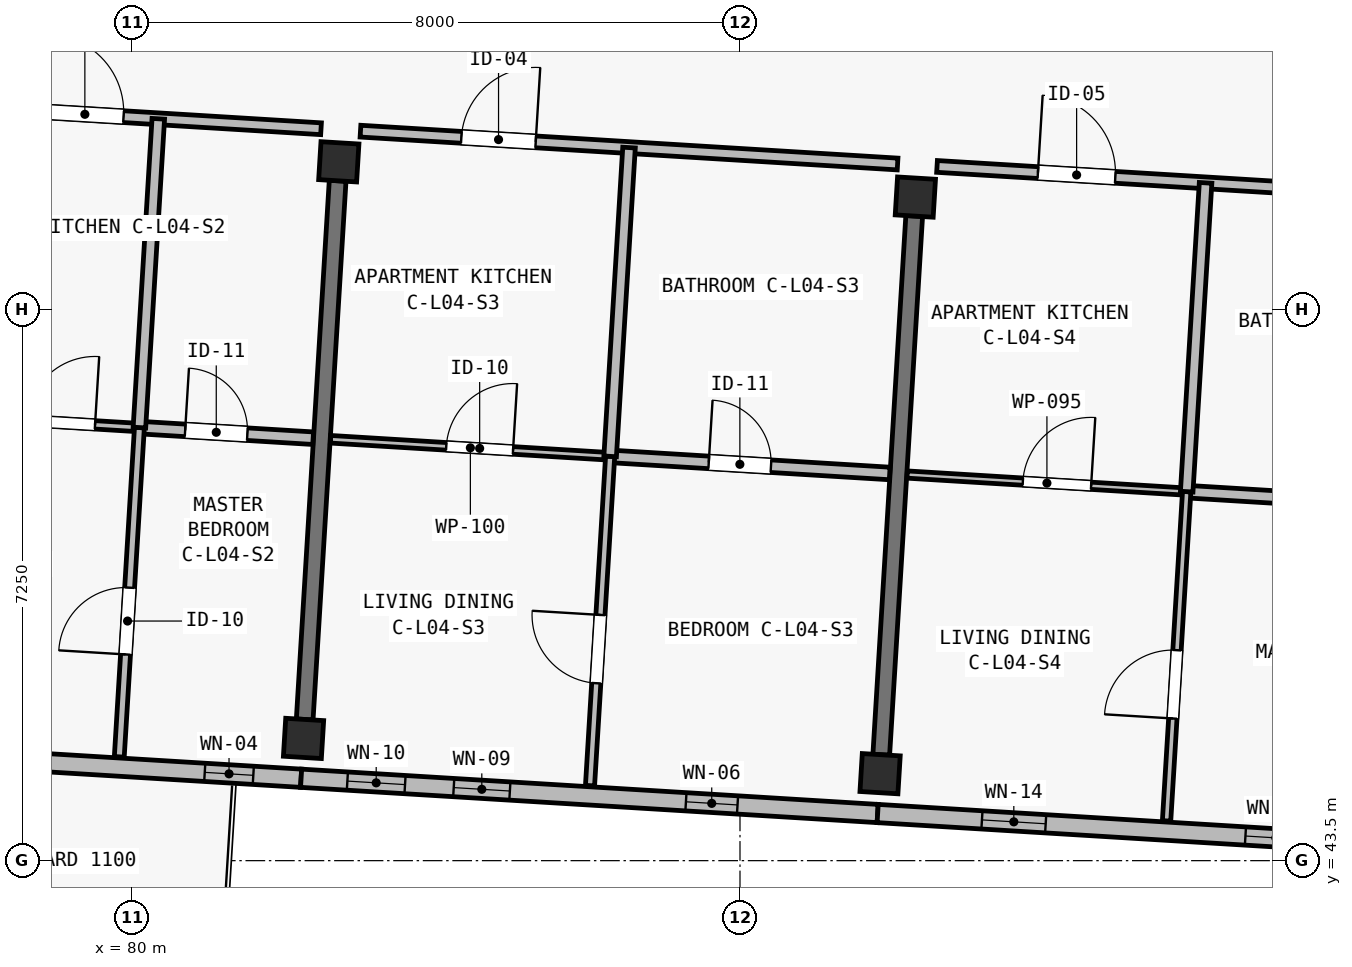
"""IFC4 building model, lengths in metres.
Left out: names, types, materials, properties, quantities, classifications, styles, units other than length and angle.
Written with IfcOpenShell. Run it as: python <this file> out.ifc"""

import sys

from ifc_helpers import new_model, si_unit, direction, frame, frame_2d, origin, origin_2d, place, context, subcontext, project, spatial, rectangle, extrude, element, fill, save


model = new_model("IFC4")
c1 = context("Model", 3, precision=1e-05, world=origin(), true_north=direction((0.0, 1.0)))
c2 = subcontext(c1, "Body", "Model", "MODEL_VIEW")
j1 = project(units=[si_unit("LENGTHUNIT", "METRE"), si_unit("PLANEANGLEUNIT", "RADIAN")], contexts=[c1])
p1 = place(None, origin())
s1 = spatial("IfcSite", under=j1, at=p1, CompositionType="ELEMENT")
p2 = place(p1, origin())
s2 = spatial("IfcBuilding", under=s1, at=p2, CompositionType="ELEMENT")
p3 = place(p2, frame((0.0, 0.0, 14.9)))
s3 = spatial("IfcBuildingStorey", under=s2, at=p3, CompositionType="ELEMENT", Elevation=14.9)
for number, where, z_axis, x_axis in (
    (1, (82.258, 45.108, 0.0), (0.0, 0.0, 1.0), (0.998, -0.061, 0.0)),
    (2, (82.721, 52.694, 0.0), (0.0, 0.0, 1.0), (0.998, -0.061, 0.0)),
    (3, (89.843, 44.644, 0.0), (0.0, 0.0, 1.0), (0.998, -0.061, 0.0)),
    (4, (90.307, 52.23, 0.0), (0.0, 0.0, 1.0), (0.998, -0.061, 0.0)),
):
    element("IfcColumn", number, at=place(p3, frame(where, z_axis=z_axis, x_axis=x_axis)), inside=s3, PredefinedType="COLUMN", context=c2, shape_type="SweptSolid", body=[
        extrude(rectangle(XDim=0.5, YDim=0.5, at=origin_2d()), origin(), (0.0, 0.0, 1.0), 3.25),
    ])
p4 = place(p3, frame((82.273, 45.358, 0.0), z_axis=(0.0, 0.0, 1.0), x_axis=(0.061070212127, 0.998133472633, 0.0)))
e5 = element("IfcWall", 5, at=p4, inside=s3, PredefinedType="SHEAR", context=c2, shape_type="SweptSolid", body=[
    extrude(rectangle(XDim=7.1, YDim=0.22, at=frame_2d((3.55, 0.0))), origin(), (0.0, 0.0, 1.0), 2.5),
])
p5 = place(p3, frame((89.859, 44.894, 0.0), z_axis=(0.0, 0.0, 1.0), x_axis=(0.061033859059, 0.99813569621, 0.0)))
e6 = element("IfcWall", 6, at=p5, inside=s3, PredefinedType="SHEAR", context=c2, shape_type="SweptSolid", body=[
    extrude(rectangle(XDim=7.1, YDim=0.22, at=frame_2d((3.55, 0.0))), origin(), (0.0, 0.0, 1.0), 2.5),
])
p6 = place(p3, frame((82.225, 44.584, 0.0), z_axis=(0.0, 0.0, 1.0), x_axis=(-0.998133591969, 0.061068261669, 0.0)))
e7 = element("IfcWall", 7, at=p6, inside=s3, PredefinedType="SOLIDWALL", context=c2, shape_type="SweptSolid", body=[
    extrude(rectangle(XDim=7.6, YDim=0.24, at=frame_2d((3.8, 0.0))), origin(), (0.0, 0.0, 1.0), 3.0),
])
p7 = place(p6, frame((5.019, 0.0, 0.0)))
e8 = element("IfcOpeningElement", 8, at=p7, cuts=e7, PredefinedType="OPENING", context=c2, shape_type="SweptSolid", body=[
    extrude(rectangle(XDim=1.8, YDim=2.12, at=frame_2d((0.9, 1.06))), frame((0.0, 0.135, 0.0), z_axis=(0.0, -1.0, 0.0), x_axis=(1.0, 0.0, 0.0)), (0.0, 0.0, 1.0), 0.27),
])
p8 = place(p6, frame((0.63, 0.0, 0.42)))
e9 = element("IfcOpeningElement", 9, at=p8, cuts=e7, PredefinedType="OPENING", context=c2, shape_type="SweptSolid", body=[
    extrude(rectangle(XDim=0.64, YDim=2.18, at=frame_2d((0.32, 1.09))), frame((0.0, 0.135, 0.0), z_axis=(0.0, -1.0, 0.0), x_axis=(1.0, 0.0, 0.0)), (0.0, 0.0, 1.0), 0.27),
])
p9 = place(p3, frame((89.811, 44.12, 0.0), z_axis=(0.0, 0.0, 1.0), x_axis=(-0.998135669243, 0.061034300063, 0.0)))
e10 = element("IfcWall", 10, at=p9, inside=s3, PredefinedType="SOLIDWALL", context=c2, shape_type="SweptSolid", body=[
    extrude(rectangle(XDim=7.6, YDim=0.24, at=frame_2d((3.8, 0.0))), origin(), (0.0, 0.0, 1.0), 3.0),
])
p10 = place(p9, frame((1.847, 0.0, 0.48)))
e11 = element("IfcOpeningElement", 11, at=p10, cuts=e10, PredefinedType="OPENING", context=c2, shape_type="SweptSolid", body=[
    extrude(rectangle(XDim=0.68, YDim=2.24, at=frame_2d((0.34, 1.12))), frame((0.0, 0.135, 0.0), z_axis=(0.0, -1.0, 0.0), x_axis=(1.0, 0.0, 0.0)), (0.0, 0.0, 1.0), 0.27),
])
p11 = place(p9, frame((4.848, 0.0, 0.48)))
e12 = element("IfcOpeningElement", 12, at=p11, cuts=e10, PredefinedType="OPENING", context=c2, shape_type="SweptSolid", body=[
    extrude(rectangle(XDim=0.74, YDim=2.26, at=frame_2d((0.37, 1.13))), frame((0.0, 0.135, 0.0), z_axis=(0.0, -1.0, 0.0), x_axis=(1.0, 0.0, 0.0)), (0.0, 0.0, 1.0), 0.27),
])
p12 = place(p9, frame((6.23, 0.0, 0.52)))
e13 = element("IfcOpeningElement", 13, at=p12, cuts=e10, PredefinedType="OPENING", context=c2, shape_type="SweptSolid", body=[
    extrude(rectangle(XDim=0.76, YDim=2.34, at=frame_2d((0.38, 1.17))), frame((0.0, 0.135, 0.0), z_axis=(0.0, -1.0, 0.0), x_axis=(1.0, 0.0, 0.0)), (0.0, 0.0, 1.0), 0.27),
])
p13 = place(p3, frame((97.397, 43.656, 0.0), z_axis=(0.0, 0.0, 1.0), x_axis=(-0.998135549572, 0.061036257095, 0.0)))
e14 = element("IfcWall", 14, at=p13, inside=s3, PredefinedType="SOLIDWALL", context=c2, shape_type="SweptSolid", body=[
    extrude(rectangle(XDim=7.6, YDim=0.24, at=frame_2d((3.8, 0.0))), origin(), (0.0, 0.0, 1.0), 3.0),
])
p14 = place(p13, frame((0.61, 0.0, 0.52)))
e15 = element("IfcOpeningElement", 15, at=p14, cuts=e14, PredefinedType="OPENING", context=c2, shape_type="SweptSolid", body=[
    extrude(rectangle(XDim=0.78, YDim=2.2, at=frame_2d((0.39, 1.1))), frame((0.0, 0.135, 0.0), z_axis=(0.0, -1.0, 0.0), x_axis=(1.0, 0.0, 0.0)), (0.0, 0.0, 1.0), 0.27),
])
p15 = place(p13, frame((1.952, 0.0, 0.42)))
e16 = element("IfcOpeningElement", 16, at=p15, cuts=e14, PredefinedType="OPENING", context=c2, shape_type="SweptSolid", body=[
    extrude(rectangle(XDim=0.8, YDim=2.3, at=frame_2d((0.4, 1.15))), frame((0.0, 0.135, 0.0), z_axis=(0.0, -1.0, 0.0), x_axis=(1.0, 0.0, 0.0)), (0.0, 0.0, 1.0), 0.27),
])
p16 = place(p13, frame((5.385, 0.0, 0.52)))
e17 = element("IfcOpeningElement", 17, at=p16, cuts=e14, PredefinedType="OPENING", context=c2, shape_type="SweptSolid", body=[
    extrude(rectangle(XDim=0.84, YDim=2.28, at=frame_2d((0.42, 1.14))), frame((0.0, 0.135, 0.0), z_axis=(0.0, -1.0, 0.0), x_axis=(1.0, 0.0, 0.0)), (0.0, 0.0, 1.0), 0.27),
])
p17 = place(p3, frame((78.415, 53.378, 0.0), z_axis=(0.0, 0.0, 1.0), x_axis=(0.998131852862, -0.061096679962, 0.0)))
e18 = element("IfcWall", 18, at=p17, inside=s3, PredefinedType="PARTITIONING", context=c2, shape_type="SweptSolid", body=[
    extrude(rectangle(XDim=4.08, YDim=0.155, at=frame_2d((2.04, 0.0))), origin(), (0.0, 0.0, 1.0), 2.97),
])
p18 = place(p17, frame((0.457, 0.0, 0.0)))
e19 = element("IfcOpeningElement", 19, at=p18, cuts=e18, PredefinedType="OPENING", context=c2, shape_type="SweptSolid", body=[
    extrude(rectangle(XDim=1.02, YDim=2.2, at=frame_2d((0.51, 1.1))), frame((0.0, 0.093, 0.0), z_axis=(0.0, -1.0, 0.0), x_axis=(1.0, 0.0, 0.0)), (0.0, 0.0, 1.0), 0.185),
])
p19 = place(p3, frame((75.028, 49.508, 0.0), z_axis=(0.0, 0.0, 1.0), x_axis=(0.998135637207, -0.061034823981, 0.0)))
e20 = element("IfcWall", 20, at=p19, inside=s3, PredefinedType="PARTITIONING", context=c2, shape_type="SweptSolid", body=[
    extrude(rectangle(XDim=5.08, YDim=0.11, at=frame_2d((2.54, 0.0))), origin(), (0.0, 0.0, 1.0), 2.97),
])
p20 = place(p19, frame((3.595, 0.0, 0.0)))
e21 = element("IfcOpeningElement", 21, at=p20, cuts=e20, PredefinedType="OPENING", context=c2, shape_type="SweptSolid", body=[
    extrude(rectangle(XDim=0.9, YDim=2.1, at=frame_2d((0.45, 1.05))), frame((0.0, 0.07, 0.0), z_axis=(0.0, -1.0, 0.0), x_axis=(1.0, 0.0, 0.0)), (0.0, 0.0, 1.0), 0.14),
])
p21 = place(p3, frame((80.098, 49.198, 0.0), z_axis=(0.0, 0.0, 1.0), x_axis=(0.998138723231, -0.060984335579, 0.0)))
e22 = element("IfcWall", 22, at=p21, inside=s3, PredefinedType="PLUMBINGWALL", context=c2, shape_type="SweptSolid", body=[
    extrude(rectangle(XDim=2.29, YDim=0.165, at=frame_2d((1.145, 0.0))), origin(), (0.0, 0.0, 1.0), 2.97),
])
p22 = place(p21, frame((0.603, 0.0, 0.0)))
e23 = element("IfcOpeningElement", 23, at=p22, cuts=e22, PredefinedType="OPENING", context=c2, shape_type="SweptSolid", body=[
    extrude(rectangle(XDim=0.82, YDim=2.08, at=frame_2d((0.41, 1.04))), frame((0.0, 0.097, 0.0), z_axis=(0.0, -1.0, 0.0), x_axis=(1.0, 0.0, 0.0)), (0.0, 0.0, 1.0), 0.195),
])
p23 = place(p3, frame((79.833, 44.866, 0.0), z_axis=(0.0, 0.0, 1.0), x_axis=(0.061036861365, 0.998135512621, 0.0)))
e24 = element("IfcWall", 24, at=p23, inside=s3, PredefinedType="PARTITIONING", context=c2, shape_type="SweptSolid", body=[
    extrude(rectangle(XDim=4.34, YDim=0.13, at=frame_2d((2.17, 0.0))), origin(), (0.0, 0.0, 1.0), 2.97),
])
p24 = place(p23, frame((1.35, 0.0, 0.0)))
e25 = element("IfcOpeningElement", 25, at=p24, cuts=e24, PredefinedType="OPENING", context=c2, shape_type="SweptSolid", body=[
    extrude(rectangle(XDim=0.88, YDim=2.1, at=frame_2d((0.44, 1.05))), frame((0.0, 0.08, 0.0), z_axis=(0.0, -1.0, 0.0), x_axis=(1.0, 0.0, 0.0)), (0.0, 0.0, 1.0), 0.16),
])
p25 = place(p3, frame((80.098, 49.198, 0.0), z_axis=(0.0, 0.0, 1.0), x_axis=(0.061063718724, 0.998133869907, 0.0)))
e26 = element("IfcWall", 26, at=p25, inside=s3, PredefinedType="PLUMBINGWALL", context=c2, shape_type="SweptSolid", body=[
    extrude(rectangle(XDim=4.07, YDim=0.165, at=frame_2d((2.035, 0.0))), origin(), (0.0, 0.0, 1.0), 2.97),
])
p26 = place(p3, frame((83.007, 53.097, 0.0), z_axis=(0.0, 0.0, 1.0), x_axis=(0.998135666539, -0.061034344288, 0.0)))
e27 = element("IfcWall", 27, at=p26, inside=s3, PredefinedType="PARTITIONING", context=c2, shape_type="SweptSolid", body=[
    extrude(rectangle(XDim=7.08, YDim=0.155, at=frame_2d((3.54, 0.0))), origin(), (0.0, 0.0, 1.0), 2.97),
])
p27 = place(p26, frame((1.33, 0.0, 0.0)))
e28 = element("IfcOpeningElement", 28, at=p27, cuts=e27, PredefinedType="OPENING", context=c2, shape_type="SweptSolid", body=[
    extrude(rectangle(XDim=0.98, YDim=2.15, at=frame_2d((0.49, 1.075))), frame((0.0, 0.093, 0.0), z_axis=(0.0, -1.0, 0.0), x_axis=(1.0, 0.0, 0.0)), (0.0, 0.0, 1.0), 0.185),
])
p28 = place(p3, frame((82.613, 49.044, 0.0), z_axis=(0.0, 0.0, 1.0), x_axis=(0.998136719672, -0.061017119263, 0.0)))
e29 = element("IfcWall", 29, at=p28, inside=s3, PredefinedType="PARTITIONING", context=c2, shape_type="SweptSolid", body=[
    extrude(rectangle(XDim=3.685, YDim=0.1, at=frame_2d((1.843, 0.0))), origin(), (0.0, 0.0, 1.0), 2.97),
])
p29 = place(p28, frame((1.525, 0.0, 0.0)))
e30 = element("IfcOpeningElement", 30, at=p29, cuts=e29, PredefinedType="OPENING", context=c2, shape_type="SweptSolid", body=[
    extrude(rectangle(XDim=0.88, YDim=2.1, at=frame_2d((0.44, 1.05))), frame((0.0, 0.065, 0.0), z_axis=(0.0, -1.0, 0.0), x_axis=(1.0, 0.0, 0.0)), (0.0, 0.0, 1.0), 0.13),
])
p30 = place(p3, frame((86.292, 48.819, 0.0), z_axis=(0.0, 0.0, 1.0), x_axis=(0.998132682596, -0.061083123148, 0.0)))
e31 = element("IfcWall", 31, at=p30, inside=s3, PredefinedType="PLUMBINGWALL", context=c2, shape_type="SweptSolid", body=[
    extrude(rectangle(XDim=3.685, YDim=0.165, at=frame_2d((1.843, 0.0))), origin(), (0.0, 0.0, 1.0), 2.97),
])
p31 = place(p30, frame((1.3, 0.0, 0.0)))
e32 = element("IfcOpeningElement", 32, at=p31, cuts=e31, PredefinedType="OPENING", context=c2, shape_type="SweptSolid", body=[
    extrude(rectangle(XDim=0.82, YDim=2.08, at=frame_2d((0.41, 1.04))), frame((0.0, 0.097, 0.0), z_axis=(0.0, -1.0, 0.0), x_axis=(1.0, 0.0, 0.0)), (0.0, 0.0, 1.0), 0.195),
])
p32 = place(p3, frame((86.027, 44.487, 0.0), z_axis=(0.0, 0.0, 1.0), x_axis=(0.06103343432, 0.998135722182, 0.0)))
e33 = element("IfcWall", 33, at=p32, inside=s3, PredefinedType="PARTITIONING", context=c2, shape_type="SweptSolid", body=[
    extrude(rectangle(XDim=4.34, YDim=0.12, at=frame_2d((2.17, 0.0))), origin(), (0.0, 0.0, 1.0), 2.97),
])
p33 = place(p32, frame((1.35, 0.0, 0.0)))
e34 = element("IfcOpeningElement", 34, at=p33, cuts=e33, PredefinedType="OPENING", context=c2, shape_type="SweptSolid", body=[
    extrude(rectangle(XDim=0.9, YDim=2.1, at=frame_2d((0.45, 1.05))), frame((0.0, 0.075, 0.0), z_axis=(0.0, -1.0, 0.0), x_axis=(1.0, 0.0, 0.0)), (0.0, 0.0, 1.0), 0.15),
])
p34 = place(p3, frame((86.292, 48.819, 0.0), z_axis=(0.0, 0.0, 1.0), x_axis=(0.061067374954, 0.99813364622, 0.0)))
e35 = element("IfcWall", 35, at=p34, inside=s3, PredefinedType="PLUMBINGWALL", context=c2, shape_type="SweptSolid", body=[
    extrude(rectangle(XDim=4.07, YDim=0.165, at=frame_2d((2.035, 0.0))), origin(), (0.0, 0.0, 1.0), 2.97),
])
p35 = place(p3, frame((90.593, 52.633, 0.0), z_axis=(0.0, 0.0, 1.0), x_axis=(0.998135538078, -0.061036445065, 0.0)))
e36 = element("IfcWall", 36, at=p35, inside=s3, PredefinedType="PARTITIONING", context=c2, shape_type="SweptSolid", body=[
    extrude(rectangle(XDim=7.08, YDim=0.155, at=frame_2d((3.54, 0.0))), origin(), (0.0, 0.0, 1.0), 2.97),
])
p36 = place(p35, frame((1.33, 0.0, 0.0)))
e37 = element("IfcOpeningElement", 37, at=p36, cuts=e36, PredefinedType="OPENING", context=c2, shape_type="SweptSolid", body=[
    extrude(rectangle(XDim=1.02, YDim=2.2, at=frame_2d((0.51, 1.1))), frame((0.0, 0.093, 0.0), z_axis=(0.0, -1.0, 0.0), x_axis=(1.0, 0.0, 0.0)), (0.0, 0.0, 1.0), 0.185),
])
p37 = place(p3, frame((90.199, 48.58, 0.0), z_axis=(0.0, 0.0, 1.0), x_axis=(0.998132682596, -0.061083123148, 0.0)))
e38 = element("IfcWall", 38, at=p37, inside=s3, PredefinedType="PARTITIONING", context=c2, shape_type="SweptSolid", body=[
    extrude(rectangle(XDim=3.685, YDim=0.095, at=frame_2d((1.843, 0.0))), origin(), (0.0, 0.0, 1.0), 2.97),
])
p38 = place(p37, frame((1.525, 0.0, 0.0)))
e39 = element("IfcOpeningElement", 39, at=p38, cuts=e38, PredefinedType="OPENING", context=c2, shape_type="SweptSolid", body=[
    extrude(rectangle(XDim=0.9, YDim=2.1, at=frame_2d((0.45, 1.05))), frame((0.0, 0.062, 0.0), z_axis=(0.0, -1.0, 0.0), x_axis=(1.0, 0.0, 0.0)), (0.0, 0.0, 1.0), 0.125),
])
p39 = place(p3, frame((93.877, 48.355, 0.0), z_axis=(0.0, 0.0, 1.0), x_axis=(0.998136472989, -0.061021154439, 0.0)))
e40 = element("IfcWall", 40, at=p39, inside=s3, PredefinedType="PLUMBINGWALL", context=c2, shape_type="SweptSolid", body=[
    extrude(rectangle(XDim=3.685, YDim=0.165, at=frame_2d((1.842, 0.0))), origin(), (0.0, 0.0, 1.0), 2.97),
])
p40 = place(p39, frame((1.3, 0.0, 0.0)))
e41 = element("IfcOpeningElement", 41, at=p40, cuts=e40, PredefinedType="OPENING", context=c2, shape_type="SweptSolid", body=[
    extrude(rectangle(XDim=0.82, YDim=2.08, at=frame_2d((0.41, 1.04))), frame((0.0, 0.097, 0.0), z_axis=(0.0, -1.0, 0.0), x_axis=(1.0, 0.0, 0.0)), (0.0, 0.0, 1.0), 0.195),
])
p41 = place(p3, frame((93.612, 44.023, 0.0), z_axis=(0.0, 0.0, 1.0), x_axis=(0.061092906669, 0.998132083822, 0.0)))
e42 = element("IfcWall", 42, at=p41, inside=s3, PredefinedType="PARTITIONING", context=c2, shape_type="SweptSolid", body=[
    extrude(rectangle(XDim=4.34, YDim=0.11, at=frame_2d((2.17, 0.0))), origin(), (0.0, 0.0, 1.0), 2.97),
])
p42 = place(p41, frame((1.35, 0.0, 0.0)))
e43 = element("IfcOpeningElement", 43, at=p42, cuts=e42, PredefinedType="OPENING", context=c2, shape_type="SweptSolid", body=[
    extrude(rectangle(XDim=0.9, YDim=2.1, at=frame_2d((0.45, 1.05))), frame((0.0, 0.07, 0.0), z_axis=(0.0, -1.0, 0.0), x_axis=(1.0, 0.0, 0.0)), (0.0, 0.0, 1.0), 0.14),
])
p43 = place(p3, frame((93.877, 48.355, 0.0), z_axis=(0.0, 0.0, 1.0), x_axis=(0.061003958056, 0.998137524143, 0.0)))
e44 = element("IfcWall", 44, at=p43, inside=s3, PredefinedType="PLUMBINGWALL", context=c2, shape_type="SweptSolid", body=[
    extrude(rectangle(XDim=4.07, YDim=0.165, at=frame_2d((2.035, 0.0))), origin(), (0.0, 0.0, 1.0), 2.97),
])
p44 = place(p8, origin())
e45 = element("IfcWindow", 45, at=p44, inside=s3, PartitioningType="SINGLE_PANEL", PredefinedType="WINDOW", context=c2, shape_type="SweptSolid", body=[
    extrude(rectangle(XDim=0.64, YDim=2.18, at=frame_2d((0.32, 1.09))), frame((0.0, 0.03, 0.0), z_axis=(0.0, -1.0, 0.0), x_axis=(1.0, 0.0, 0.0)), (0.0, 0.0, 1.0), 0.06),
])
fill(e9, e45)
p45 = place(p10, origin())
e46 = element("IfcWindow", 46, at=p45, inside=s3, PartitioningType="SINGLE_PANEL", PredefinedType="WINDOW", context=c2, shape_type="SweptSolid", body=[
    extrude(rectangle(XDim=0.68, YDim=2.24, at=frame_2d((0.34, 1.12))), frame((0.0, 0.03, 0.0), z_axis=(0.0, -1.0, 0.0), x_axis=(1.0, 0.0, 0.0)), (0.0, 0.0, 1.0), 0.06),
])
fill(e11, e46)
p46 = place(p11, origin())
e47 = element("IfcWindow", 47, at=p46, inside=s3, PartitioningType="SINGLE_PANEL", PredefinedType="WINDOW", context=c2, shape_type="SweptSolid", body=[
    extrude(rectangle(XDim=0.74, YDim=2.26, at=frame_2d((0.37, 1.13))), frame((0.0, 0.03, 0.0), z_axis=(0.0, -1.0, 0.0), x_axis=(1.0, 0.0, 0.0)), (0.0, 0.0, 1.0), 0.06),
])
fill(e12, e47)
p47 = place(p12, origin())
e48 = element("IfcWindow", 48, at=p47, inside=s3, PartitioningType="SINGLE_PANEL", PredefinedType="WINDOW", context=c2, shape_type="SweptSolid", body=[
    extrude(rectangle(XDim=0.76, YDim=2.34, at=frame_2d((0.38, 1.17))), frame((0.0, 0.03, 0.0), z_axis=(0.0, -1.0, 0.0), x_axis=(1.0, 0.0, 0.0)), (0.0, 0.0, 1.0), 0.06),
])
fill(e13, e48)
p48 = place(p15, origin())
e49 = element("IfcWindow", 49, at=p48, inside=s3, PartitioningType="SINGLE_PANEL", PredefinedType="WINDOW", context=c2, shape_type="SweptSolid", body=[
    extrude(rectangle(XDim=0.8, YDim=2.3, at=frame_2d((0.4, 1.15))), frame((0.0, 0.03, 0.0), z_axis=(0.0, -1.0, 0.0), x_axis=(1.0, 0.0, 0.0)), (0.0, 0.0, 1.0), 0.06),
])
fill(e16, e49)
p49 = place(p16, origin())
e50 = element("IfcWindow", 50, at=p49, inside=s3, PartitioningType="SINGLE_PANEL", PredefinedType="WINDOW", context=c2, shape_type="SweptSolid", body=[
    extrude(rectangle(XDim=0.84, YDim=2.28, at=frame_2d((0.42, 1.14))), frame((0.0, 0.03, 0.0), z_axis=(0.0, -1.0, 0.0), x_axis=(1.0, 0.0, 0.0)), (0.0, 0.0, 1.0), 0.06),
])
fill(e17, e50)
p50 = place(p18, origin())
e51 = element("IfcDoor", 51, at=p50, inside=s3, OperationType="SINGLE_SWING_LEFT", PredefinedType="DOOR", context=c2, shape_type="SweptSolid", body=[
    extrude(rectangle(XDim=1.02, YDim=2.2, at=frame_2d((0.51, 1.1))), frame((0.0, 0.025, 0.0), z_axis=(0.0, -1.0, 0.0), x_axis=(1.0, 0.0, 0.0)), (0.0, 0.0, 1.0), 0.05),
])
fill(e19, e51)
p51 = place(p20, origin())
e52 = element("IfcDoor", 52, at=p51, inside=s3, OperationType="SINGLE_SWING_RIGHT", PredefinedType="DOOR", context=c2, shape_type="SweptSolid", body=[
    extrude(rectangle(XDim=0.9, YDim=2.1, at=frame_2d((0.45, 1.05))), frame((0.0, 0.025, 0.0), z_axis=(0.0, -1.0, 0.0), x_axis=(1.0, 0.0, 0.0)), (0.0, 0.0, 1.0), 0.05),
])
fill(e21, e52)
p52 = place(p22, origin())
e53 = element("IfcDoor", 53, at=p52, inside=s3, OperationType="SINGLE_SWING_LEFT", PredefinedType="DOOR", context=c2, shape_type="SweptSolid", body=[
    extrude(rectangle(XDim=0.82, YDim=2.08, at=frame_2d((0.41, 1.04))), frame((0.0, 0.025, 0.0), z_axis=(0.0, -1.0, 0.0), x_axis=(1.0, 0.0, 0.0)), (0.0, 0.0, 1.0), 0.05),
])
fill(e23, e53)
p53 = place(p24, origin())
e54 = element("IfcDoor", 54, at=p53, inside=s3, OperationType="SINGLE_SWING_LEFT", PredefinedType="DOOR", context=c2, shape_type="SweptSolid", body=[
    extrude(rectangle(XDim=0.88, YDim=2.1, at=frame_2d((0.44, 1.05))), frame((0.0, 0.025, 0.0), z_axis=(0.0, -1.0, 0.0), x_axis=(1.0, 0.0, 0.0)), (0.0, 0.0, 1.0), 0.05),
])
fill(e25, e54)
p54 = place(p27, origin())
e55 = element("IfcDoor", 55, at=p54, inside=s3, OperationType="SINGLE_SWING_RIGHT", PredefinedType="DOOR", context=c2, shape_type="SweptSolid", body=[
    extrude(rectangle(XDim=0.98, YDim=2.15, at=frame_2d((0.49, 1.075))), frame((0.0, 0.025, 0.0), z_axis=(0.0, -1.0, 0.0), x_axis=(1.0, 0.0, 0.0)), (0.0, 0.0, 1.0), 0.05),
])
fill(e28, e55)
p55 = place(p29, origin())
e56 = element("IfcDoor", 56, at=p55, inside=s3, OperationType="SINGLE_SWING_RIGHT", PredefinedType="DOOR", context=c2, shape_type="SweptSolid", body=[
    extrude(rectangle(XDim=0.88, YDim=2.1, at=frame_2d((0.44, 1.05))), frame((0.0, 0.025, 0.0), z_axis=(0.0, -1.0, 0.0), x_axis=(1.0, 0.0, 0.0)), (0.0, 0.0, 1.0), 0.05),
])
fill(e30, e56)
p56 = place(p31, origin())
e57 = element("IfcDoor", 57, at=p56, inside=s3, OperationType="SINGLE_SWING_LEFT", PredefinedType="DOOR", context=c2, shape_type="SweptSolid", body=[
    extrude(rectangle(XDim=0.82, YDim=2.08, at=frame_2d((0.41, 1.04))), frame((0.0, 0.025, 0.0), z_axis=(0.0, -1.0, 0.0), x_axis=(1.0, 0.0, 0.0)), (0.0, 0.0, 1.0), 0.05),
])
fill(e32, e57)
p57 = place(p33, origin())
e58 = element("IfcDoor", 58, at=p57, inside=s3, OperationType="SINGLE_SWING_RIGHT", PredefinedType="DOOR", context=c2, shape_type="SweptSolid", body=[
    extrude(rectangle(XDim=0.9, YDim=2.1, at=frame_2d((0.45, 1.05))), frame((0.0, 0.025, 0.0), z_axis=(0.0, -1.0, 0.0), x_axis=(1.0, 0.0, 0.0)), (0.0, 0.0, 1.0), 0.05),
])
fill(e34, e58)
p58 = place(p36, origin())
e59 = element("IfcDoor", 59, at=p58, inside=s3, OperationType="SINGLE_SWING_LEFT", PredefinedType="DOOR", context=c2, shape_type="SweptSolid", body=[
    extrude(rectangle(XDim=1.02, YDim=2.2, at=frame_2d((0.51, 1.1))), frame((0.0, 0.025, 0.0), z_axis=(0.0, -1.0, 0.0), x_axis=(1.0, 0.0, 0.0)), (0.0, 0.0, 1.0), 0.05),
])
fill(e37, e59)
p59 = place(p38, origin())
e60 = element("IfcDoor", 60, at=p59, inside=s3, OperationType="SINGLE_SWING_RIGHT", PredefinedType="DOOR", context=c2, shape_type="SweptSolid", body=[
    extrude(rectangle(XDim=0.9, YDim=2.1, at=frame_2d((0.45, 1.05))), frame((0.0, 0.025, 0.0), z_axis=(0.0, -1.0, 0.0), x_axis=(1.0, 0.0, 0.0)), (0.0, 0.0, 1.0), 0.05),
])
fill(e39, e60)
p60 = place(p42, origin())
e61 = element("IfcDoor", 61, at=p60, inside=s3, OperationType="SINGLE_SWING_LEFT", PredefinedType="DOOR", context=c2, shape_type="SweptSolid", body=[
    extrude(rectangle(XDim=0.9, YDim=2.1, at=frame_2d((0.45, 1.05))), frame((0.0, 0.025, 0.0), z_axis=(0.0, -1.0, 0.0), x_axis=(1.0, 0.0, 0.0)), (0.0, 0.0, 1.0), 0.05),
])
fill(e43, e61)
save(model, sys.argv[1])
